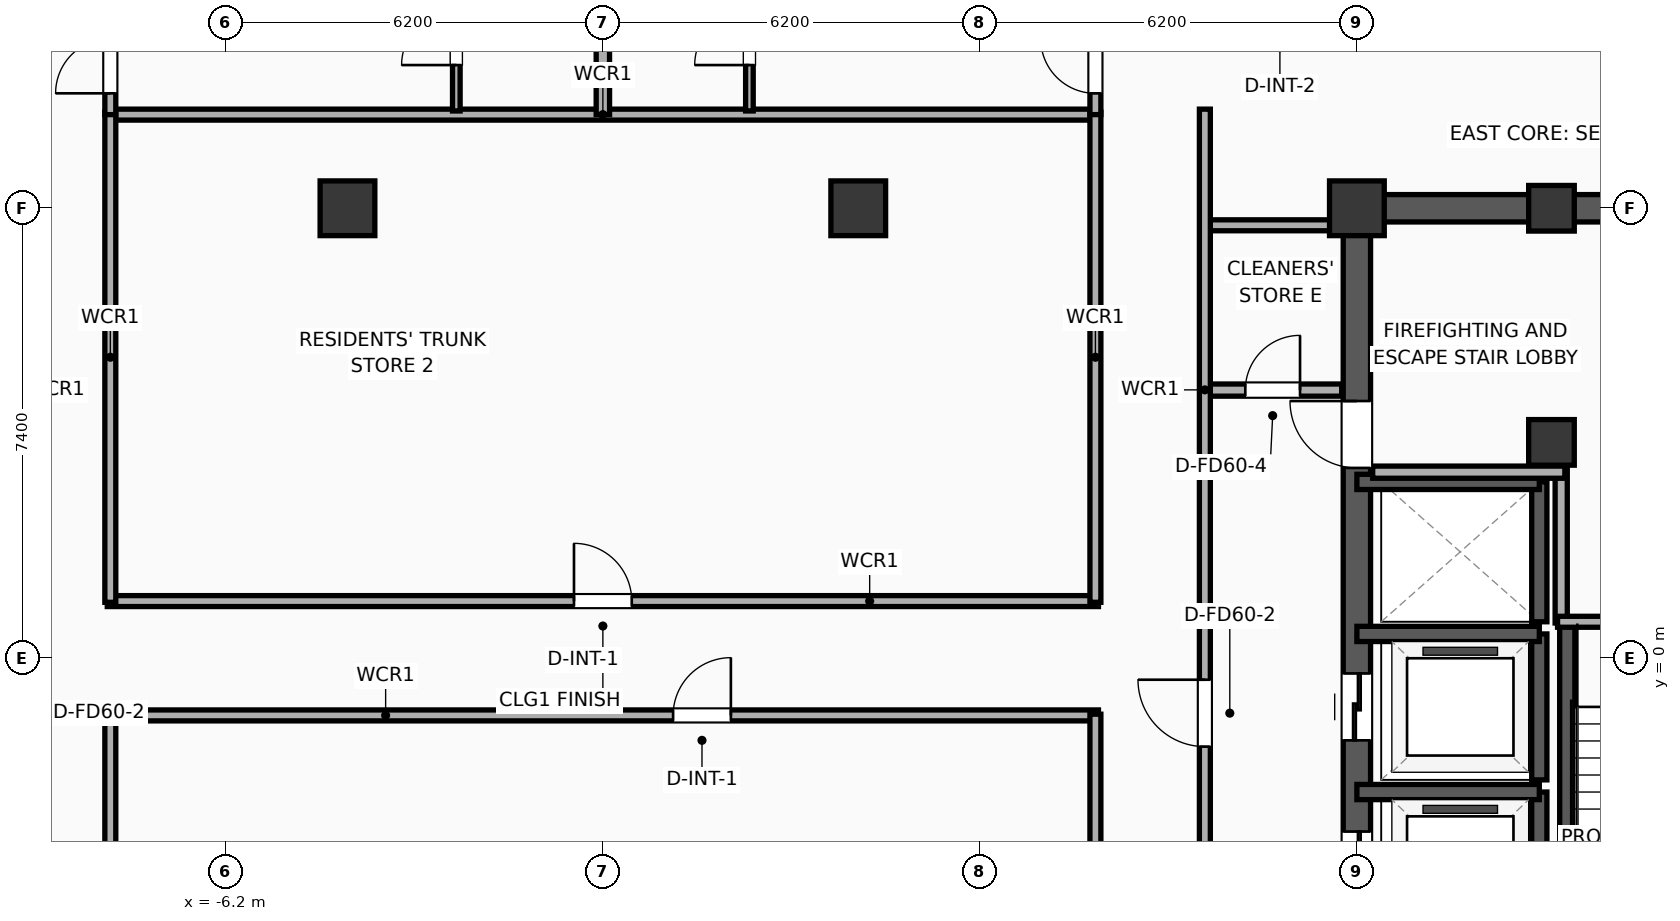
"""IFC4 building model, lengths in metres.
Left out: names, types, materials, properties, quantities, classifications, styles, units other than length and angle.
Written with IfcOpenShell. Run it as: python <this file> out.ifc"""

import sys

from ifc_helpers import new_model, si_unit, direction, frame, frame_2d, origin, origin_2d, place, context, subcontext, project, spatial, rectangle, extrude, element, fill, save


model = new_model("IFC4")
c1 = context("Model", 3, precision=1e-05, world=origin(), true_north=direction((0.0, 1.0)))
c2 = subcontext(c1, "Body", "Model", "MODEL_VIEW")
j1 = project(units=[si_unit("LENGTHUNIT", "METRE"), si_unit("PLANEANGLEUNIT", "RADIAN")], contexts=[c1])
p1 = place(None, origin())
s1 = spatial("IfcSite", under=j1, at=p1, CompositionType="ELEMENT")
p2 = place(p1, origin())
s2 = spatial("IfcBuilding", under=s1, at=p2, CompositionType="ELEMENT")
p3 = place(p2, frame((0.0, 0.0, 159.9)))
s3 = spatial("IfcBuildingStorey", under=s2, at=p3, CompositionType="ELEMENT", Elevation=159.9)
p4 = place(p3, frame((15.6, 3.55, 0.0), z_axis=(0.0, 0.0, 1.0), x_axis=(1.0, 0.0, 0.0)))
e1 = element("IfcColumn", 1, at=p4, inside=s3, PredefinedType="COLUMN", context=c2, shape_type="SweptSolid", body=[
    extrude(rectangle(XDim=0.75, YDim=0.75, at=origin_2d()), origin(), (0.0, 0.0, 1.0), 3.9),
])
p5 = place(p3, frame((12.4, 7.4, 0.0), z_axis=(0.0, 0.0, 1.0), x_axis=(1.0, 0.0, 0.0)))
e2 = element("IfcColumn", 2, at=p5, inside=s3, PredefinedType="COLUMN", context=c2, shape_type="SweptSolid", body=[
    extrude(rectangle(XDim=0.9, YDim=0.9, at=origin_2d()), origin(), (0.0, 0.0, 1.0), 3.9),
])
p6 = place(p3, frame((15.6, 7.4, 0.0), z_axis=(0.0, 0.0, 1.0), x_axis=(1.0, 0.0, 0.0)))
e3 = element("IfcColumn", 3, at=p6, inside=s3, PredefinedType="COLUMN", context=c2, shape_type="SweptSolid", body=[
    extrude(rectangle(XDim=0.75, YDim=0.75, at=origin_2d()), origin(), (0.0, 0.0, 1.0), 3.9),
])
p7 = place(p3, frame((12.175, 7.4, 0.0), z_axis=(0.0, 0.0, 1.0), x_axis=(1.0, 0.0, 0.0)))
e4 = element("IfcWall", 4, at=p7, inside=s3, PredefinedType="SHEAR", context=c2, shape_type="SweptSolid", body=[
    extrude(rectangle(XDim=7.25, YDim=0.45, at=frame_2d((3.625, 0.0))), origin(), (0.0, 0.0, 1.0), 3.65),
])
p8 = place(p3, frame((12.4, -7.4, 0.0), z_axis=(0.0, 0.0, 1.0), x_axis=(0.0, 1.0, 0.0)))
e5 = element("IfcWall", 5, at=p8, inside=s3, PredefinedType="SHEAR", context=c2, shape_type="SweptSolid", body=[
    extrude(rectangle(XDim=14.8, YDim=0.45, at=frame_2d((7.4, 0.0))), origin(), (0.0, 0.0, 1.0), 3.65),
])
p9 = place(p8, frame((3.45, 0.0, 0.0)))
e6 = element("IfcOpeningElement", 6, at=p9, cuts=e5, PredefinedType="OPENING", context=c2, shape_type="SweptSolid", body=[
    extrude(rectangle(XDim=1.1, YDim=2.05, at=frame_2d((0.55, 1.025))), frame((0.0, 0.235, 0.0), z_axis=(0.0, -1.0, 0.0), x_axis=(1.0, 0.0, 0.0)), (0.0, 0.0, 1.0), 0.47),
])
p10 = place(p8, frame((6.05, 0.0, 0.0)))
e7 = element("IfcOpeningElement", 7, at=p10, cuts=e5, PredefinedType="OPENING", context=c2, shape_type="SweptSolid", body=[
    extrude(rectangle(XDim=1.1, YDim=2.05, at=frame_2d((0.55, 1.025))), frame((0.0, 0.235, 0.0), z_axis=(0.0, -1.0, 0.0), x_axis=(1.0, 0.0, 0.0)), (0.0, 0.0, 1.0), 0.47),
])
p11 = place(p8, frame((10.53, 0.0, 0.0)))
e8 = element("IfcOpeningElement", 8, at=p11, cuts=e5, PredefinedType="OPENING", context=c2, shape_type="SweptSolid", body=[
    extrude(rectangle(XDim=1.1, YDim=2.05, at=frame_2d((0.55, 1.025))), frame((0.0, 0.235, 0.0), z_axis=(0.0, -1.0, 0.0), x_axis=(1.0, 0.0, 0.0)), (0.0, 0.0, 1.0), 0.47),
])
p12 = place(p8, frame((1.0, 0.0, 0.0)))
e9 = element("IfcOpeningElement", 9, at=p12, cuts=e5, PredefinedType="OPENING", context=c2, shape_type="SweptSolid", body=[
    extrude(rectangle(XDim=0.9, YDim=2.05, at=frame_2d((0.45, 1.025))), frame((0.0, 0.235, 0.0), z_axis=(0.0, -1.0, 0.0), x_axis=(1.0, 0.0, 0.0)), (0.0, 0.0, 1.0), 0.47),
])
p13 = place(p3, frame((15.86, -7.085, 0.0), z_axis=(0.0, 0.0, 1.0), x_axis=(0.0, 1.0, 0.0)))
e10 = element("IfcWall", 10, at=p13, inside=s3, PredefinedType="SOLIDWALL", context=c2, shape_type="SweptSolid", body=[
    extrude(rectangle(XDim=7.685, YDim=0.25, at=frame_2d((3.843, 0.0))), origin(), (0.0, 0.0, 1.0), 3.65),
])
for number, where, z_axis, x_axis in (
    (11, (-4.2, 7.4, 0.0), (0.0, 0.0, 1.0), (1.0, 0.0, 0.0)),
    (12, (4.2, 7.4, 0.0), (0.0, 0.0, 1.0), (1.0, 0.0, 0.0)),
):
    element("IfcColumn", number, at=place(p3, frame(where, z_axis=z_axis, x_axis=x_axis)), inside=s3, PredefinedType="COLUMN", context=c2, shape_type="SweptSolid", body=[
        extrude(rectangle(XDim=0.9, YDim=0.9, at=origin_2d()), origin(), (0.0, 0.0, 1.0), 3.9),
    ])
p14 = place(p3, frame((15.4, -4.6, 0.0), z_axis=(0.0, 0.0, 1.0), x_axis=(0.0, 1.0, 0.0)))
e13 = element("IfcWall", 13, at=p14, inside=s3, PredefinedType="SOLIDWALL", context=c2, shape_type="SweptSolid", body=[
    extrude(rectangle(XDim=2.4, YDim=0.25, at=frame_2d((1.2, 0.0))), origin(), (0.0, 0.0, 1.0), 3.65),
])
p15 = place(p3, frame((15.4, -2.2, 0.0), z_axis=(0.0, 0.0, 1.0), x_axis=(-1.0, 0.0, 0.0)))
e14 = element("IfcWall", 14, at=p15, inside=s3, PredefinedType="SOLIDWALL", context=c2, shape_type="SweptSolid", body=[
    extrude(rectangle(XDim=3.0, YDim=0.25, at=frame_2d((1.5, 0.0))), origin(), (0.0, 0.0, 1.0), 3.65),
])
p16 = place(p3, frame((15.4, -2.0, 0.0), z_axis=(0.0, 0.0, 1.0), x_axis=(0.0, 1.0, 0.0)))
e15 = element("IfcWall", 15, at=p16, inside=s3, PredefinedType="SOLIDWALL", context=c2, shape_type="SweptSolid", body=[
    extrude(rectangle(XDim=2.4, YDim=0.25, at=frame_2d((1.2, 0.0))), origin(), (0.0, 0.0, 1.0), 3.65),
])
p17 = place(p3, frame((15.4, 0.4, 0.0), z_axis=(0.0, 0.0, 1.0), x_axis=(-1.0, 0.0, 0.0)))
e16 = element("IfcWall", 16, at=p17, inside=s3, PredefinedType="SOLIDWALL", context=c2, shape_type="SweptSolid", body=[
    extrude(rectangle(XDim=3.0, YDim=0.25, at=frame_2d((1.5, 0.0))), origin(), (0.0, 0.0, 1.0), 3.65),
])
p18 = place(p3, frame((15.4, 0.6, 0.0), z_axis=(0.0, 0.0, 1.0), x_axis=(0.0, 1.0, 0.0)))
e17 = element("IfcWall", 17, at=p18, inside=s3, PredefinedType="SOLIDWALL", context=c2, shape_type="SweptSolid", body=[
    extrude(rectangle(XDim=2.3, YDim=0.25, at=frame_2d((1.15, 0.0))), origin(), (0.0, 0.0, 1.0), 3.65),
])
p19 = place(p3, frame((15.4, 2.9, 0.0), z_axis=(0.0, 0.0, 1.0), x_axis=(-1.0, 0.0, 0.0)))
e18 = element("IfcWall", 18, at=p19, inside=s3, PredefinedType="SOLIDWALL", context=c2, shape_type="SweptSolid", body=[
    extrude(rectangle(XDim=3.0, YDim=0.25, at=frame_2d((1.5, 0.0))), origin(), (0.0, 0.0, 1.0), 3.65),
])
p20 = place(p3, frame((15.76, 0.58, 0.0), z_axis=(0.0, 0.0, 1.0), x_axis=(0.0, 1.0, 0.0)))
e19 = element("IfcWall", 19, at=p20, inside=s3, PredefinedType="PARTITIONING", context=c2, shape_type="SweptSolid", body=[
    extrude(rectangle(XDim=2.52, YDim=0.2, at=frame_2d((1.26, 0.0))), origin(), (0.0, 0.0, 1.0), 3.65),
])
p21 = place(p3, frame((12.66, 3.06, 0.0), z_axis=(0.0, 0.0, 1.0), x_axis=(1.0, 0.0, 0.0)))
e20 = element("IfcWall", 20, at=p21, inside=s3, PredefinedType="PARTITIONING", context=c2, shape_type="SweptSolid", body=[
    extrude(rectangle(XDim=3.16, YDim=0.2, at=frame_2d((1.58, 0.0))), origin(), (0.0, 0.0, 1.0), 3.65),
])
p22 = place(p3, frame((15.7, 0.6, 0.0), z_axis=(0.0, 0.0, 1.0), x_axis=(1.0, 0.0, 0.0)))
e21 = element("IfcWall", 21, at=p22, inside=s3, PredefinedType="PARTITIONING", context=c2, shape_type="SweptSolid", body=[
    extrude(rectangle(XDim=3.36, YDim=0.18, at=frame_2d((1.68, 0.0))), origin(), (0.0, 0.0, 1.0), 3.65),
])
p23 = place(p22, frame((1.155, 0.0, 0.0)))
e22 = element("IfcOpeningElement", 22, at=p23, cuts=e21, PredefinedType="OPENING", context=c2, shape_type="SweptSolid", body=[
    extrude(rectangle(XDim=1.05, YDim=2.05, at=frame_2d((0.525, 1.025))), frame((0.0, 0.1, 0.0), z_axis=(0.0, -1.0, 0.0), x_axis=(1.0, 0.0, 0.0)), (0.0, 0.0, 1.0), 0.2),
])
p24 = place(p3, frame((9.88, 4.41, 0.0), z_axis=(0.0, 0.0, 1.0), x_axis=(1.0, 0.0, 0.0)))
e23 = element("IfcWall", 23, at=p24, inside=s3, PredefinedType="PARTITIONING", context=c2, shape_type="SweptSolid", body=[
    extrude(rectangle(XDim=2.27, YDim=0.2, at=frame_2d((1.135, 0.0))), origin(), (0.0, 0.0, 1.0), 3.65),
])
p25 = place(p24, frame((0.685, 0.0, 0.0)))
e24 = element("IfcOpeningElement", 24, at=p25, cuts=e23, PredefinedType="OPENING", context=c2, shape_type="SweptSolid", body=[
    extrude(rectangle(XDim=0.9, YDim=2.05, at=frame_2d((0.45, 1.025))), frame((0.0, 0.11, 0.0), z_axis=(0.0, -1.0, 0.0), x_axis=(1.0, 0.0, 0.0)), (0.0, 0.0, 1.0), 0.22),
])
p26 = place(p3, frame((9.88, 7.12, 0.0), z_axis=(0.0, 0.0, 1.0), x_axis=(1.0, 0.0, 0.0)))
e25 = element("IfcWall", 25, at=p26, inside=s3, PredefinedType="PARTITIONING", context=c2, shape_type="SweptSolid", body=[
    extrude(rectangle(XDim=2.27, YDim=0.18, at=frame_2d((1.135, 0.0))), origin(), (0.0, 0.0, 1.0), 3.65),
])
p27 = place(p3, frame((9.9, -9.03, 0.0), z_axis=(0.0, 0.0, 1.0), x_axis=(0.0, 1.0, 0.0)))
e26 = element("IfcWall", 26, at=p27, inside=s3, PredefinedType="PARTITIONING", context=c2, shape_type="SweptSolid", body=[
    extrude(rectangle(XDim=18.06, YDim=0.18, at=frame_2d((9.03, 0.0))), origin(), (0.0, 0.0, 1.0), 3.65),
])
p28 = place(p27, frame((7.577, 0.0, 0.0)))
e27 = element("IfcOpeningElement", 27, at=p28, cuts=e26, PredefinedType="OPENING", context=c2, shape_type="SweptSolid", body=[
    extrude(rectangle(XDim=1.1, YDim=2.05, at=frame_2d((0.55, 1.025))), frame((0.0, 0.1, 0.0), z_axis=(0.0, -1.0, 0.0), x_axis=(1.0, 0.0, 0.0)), (0.0, 0.0, 1.0), 0.2),
])
p29 = place(p3, frame((-8.15, 8.94, 0.0), z_axis=(0.0, 0.0, 1.0), x_axis=(1.0, 0.0, 0.0)))
e28 = element("IfcWall", 28, at=p29, inside=s3, PredefinedType="PARTITIONING", context=c2, shape_type="SweptSolid", body=[
    extrude(rectangle(XDim=16.3, YDim=0.18, at=frame_2d((8.15, 0.0))), origin(), (0.0, 0.0, 1.0), 3.65),
])
p30 = place(p3, frame((-8.15, 0.94, 0.0), z_axis=(0.0, 0.0, 1.0), x_axis=(1.0, 0.0, 0.0)))
e29 = element("IfcWall", 29, at=p30, inside=s3, PredefinedType="PARTITIONING", context=c2, shape_type="SweptSolid", body=[
    extrude(rectangle(XDim=16.3, YDim=0.18, at=frame_2d((8.15, 0.0))), origin(), (0.0, 0.0, 1.0), 3.65),
])
p31 = place(p30, frame((7.675, 0.0, 0.0)))
e30 = element("IfcOpeningElement", 30, at=p31, cuts=e29, PredefinedType="OPENING", context=c2, shape_type="SweptSolid", body=[
    extrude(rectangle(XDim=0.95, YDim=2.05, at=frame_2d((0.475, 1.025))), frame((0.0, 0.1, 0.0), z_axis=(0.0, -1.0, 0.0), x_axis=(1.0, 0.0, 0.0)), (0.0, 0.0, 1.0), 0.2),
])
p32 = place(p3, frame((-8.15, -0.94, 0.0), z_axis=(0.0, 0.0, 1.0), x_axis=(1.0, 0.0, 0.0)))
e31 = element("IfcWall", 31, at=p32, inside=s3, PredefinedType="PARTITIONING", context=c2, shape_type="SweptSolid", body=[
    extrude(rectangle(XDim=16.3, YDim=0.18, at=frame_2d((8.15, 0.0))), origin(), (0.0, 0.0, 1.0), 3.65),
])
p33 = place(p32, frame((9.305, 0.0, 0.0)))
e32 = element("IfcOpeningElement", 32, at=p33, cuts=e31, PredefinedType="OPENING", context=c2, shape_type="SweptSolid", body=[
    extrude(rectangle(XDim=0.95, YDim=2.05, at=frame_2d((0.475, 1.025))), frame((0.0, 0.1, 0.0), z_axis=(0.0, -1.0, 0.0), x_axis=(1.0, 0.0, 0.0)), (0.0, 0.0, 1.0), 0.2),
])
p34 = place(p3, frame((-8.1, 0.92, 0.0), z_axis=(0.0, 0.0, 1.0), x_axis=(0.0, 1.0, 0.0)))
e33 = element("IfcWall", 33, at=p34, inside=s3, PredefinedType="PARTITIONING", context=c2, shape_type="SweptSolid", body=[
    extrude(rectangle(XDim=8.06, YDim=0.18, at=frame_2d((4.03, 0.0))), origin(), (0.0, 0.0, 1.0), 3.65),
])
p35 = place(p3, frame((-8.1, -8.98, 0.0), z_axis=(0.0, 0.0, 1.0), x_axis=(0.0, 1.0, 0.0)))
e34 = element("IfcWall", 34, at=p35, inside=s3, PredefinedType="PARTITIONING", context=c2, shape_type="SweptSolid", body=[
    extrude(rectangle(XDim=8.06, YDim=0.18, at=frame_2d((4.03, 0.0))), origin(), (0.0, 0.0, 1.0), 3.65),
])
p36 = place(p35, frame((0.79, 0.0, 0.0)))
e35 = element("IfcOpeningElement", 35, at=p36, cuts=e34, PredefinedType="OPENING", context=c2, shape_type="SweptSolid", body=[
    extrude(rectangle(XDim=1.0, YDim=2.05, at=frame_2d((0.5, 1.025))), frame((0.0, 0.1, 0.0), z_axis=(0.0, -1.0, 0.0), x_axis=(1.0, 0.0, 0.0)), (0.0, 0.0, 1.0), 0.2),
])
for number, where, z_axis, x_axis in (
    (36, (8.1, 0.92, 0.0), (0.0, 0.0, 1.0), (0.0, 1.0, 0.0)),
    (37, (8.1, -8.98, 0.0), (0.0, 0.0, 1.0), (0.0, 1.0, 0.0)),
):
    element("IfcWall", number, at=place(p3, frame(where, z_axis=z_axis, x_axis=x_axis)), inside=s3, PredefinedType="PARTITIONING", context=c2, shape_type="SweptSolid", body=[
        extrude(rectangle(XDim=8.06, YDim=0.18, at=frame_2d((4.03, 0.0))), origin(), (0.0, 0.0, 1.0), 3.65),
    ])
p37 = place(p3, frame((-2.41, 9.0, 0.0), z_axis=(0.0, 0.0, 1.0), x_axis=(0.0, 1.0, 0.0)))
e38 = element("IfcWall", 38, at=p37, inside=s3, PredefinedType="PARTITIONING", context=c2, shape_type="SweptSolid", body=[
    extrude(rectangle(XDim=2.41, YDim=0.125, at=frame_2d((1.205, 0.0))), origin(), (0.0, 0.0, 1.0), 3.65),
])
p38 = place(p37, frame((0.755, 0.0, 0.0)))
e39 = element("IfcOpeningElement", 39, at=p38, cuts=e38, PredefinedType="OPENING", context=c2, shape_type="SweptSolid", body=[
    extrude(rectangle(XDim=0.9, YDim=2.05, at=frame_2d((0.45, 1.025))), frame((0.0, 0.073, 0.0), z_axis=(0.0, -1.0, 0.0), x_axis=(1.0, 0.0, 0.0)), (0.0, 0.0, 1.0), 0.145),
])
p39 = place(p3, frame((-8.1, 8.94, 0.0), z_axis=(0.0, 0.0, 1.0), x_axis=(0.0, 1.0, 0.0)))
e40 = element("IfcWall", 40, at=p39, inside=s3, PredefinedType="PARTITIONING", context=c2, shape_type="SweptSolid", body=[
    extrude(rectangle(XDim=10.286, YDim=0.18, at=frame_2d((5.143, 0.0))), origin(), (0.0, 0.0, 1.0), 3.65),
])
p40 = place(p39, frame((0.35, 0.0, 0.0)))
e41 = element("IfcOpeningElement", 41, at=p40, cuts=e40, PredefinedType="OPENING", context=c2, shape_type="SweptSolid", body=[
    extrude(rectangle(XDim=0.9, YDim=2.05, at=frame_2d((0.45, 1.025))), frame((0.0, 0.1, 0.0), z_axis=(0.0, -1.0, 0.0), x_axis=(1.0, 0.0, 0.0)), (0.0, 0.0, 1.0), 0.2),
])
p41 = place(p3, frame((2.41, 9.0, 0.0), z_axis=(0.0, 0.0, 1.0), x_axis=(0.0, 1.0, 0.0)))
e42 = element("IfcWall", 42, at=p41, inside=s3, PredefinedType="PARTITIONING", context=c2, shape_type="SweptSolid", body=[
    extrude(rectangle(XDim=2.41, YDim=0.125, at=frame_2d((1.205, 0.0))), origin(), (0.0, 0.0, 1.0), 3.65),
])
p42 = place(p41, frame((0.755, 0.0, 0.0)))
e43 = element("IfcOpeningElement", 43, at=p42, cuts=e42, PredefinedType="OPENING", context=c2, shape_type="SweptSolid", body=[
    extrude(rectangle(XDim=0.9, YDim=2.05, at=frame_2d((0.45, 1.025))), frame((0.0, 0.073, 0.0), z_axis=(0.0, -1.0, 0.0), x_axis=(1.0, 0.0, 0.0)), (0.0, 0.0, 1.0), 0.145),
])
p43 = place(p3, frame((8.1, 8.94, 0.0), z_axis=(0.0, 0.0, 1.0), x_axis=(0.0, 1.0, 0.0)))
e44 = element("IfcWall", 44, at=p43, inside=s3, PredefinedType="PARTITIONING", context=c2, shape_type="SweptSolid", body=[
    extrude(rectangle(XDim=11.989, YDim=0.18, at=frame_2d((5.995, 0.0))), origin(), (0.0, 0.0, 1.0), 3.65),
])
p44 = place(p43, frame((0.35, 0.0, 0.0)))
e45 = element("IfcOpeningElement", 45, at=p44, cuts=e44, PredefinedType="OPENING", context=c2, shape_type="SweptSolid", body=[
    extrude(rectangle(XDim=0.9, YDim=2.05, at=frame_2d((0.45, 1.025))), frame((0.0, 0.1, 0.0), z_axis=(0.0, -1.0, 0.0), x_axis=(1.0, 0.0, 0.0)), (0.0, 0.0, 1.0), 0.2),
])
p45 = place(p3, frame((0.0, 8.94, 0.0), z_axis=(0.0, 0.0, 1.0), x_axis=(0.0, 1.0, 0.0)))
e46 = element("IfcWall", 46, at=p45, inside=s3, PredefinedType="PARTITIONING", context=c2, shape_type="SweptSolid", body=[
    extrude(rectangle(XDim=11.138, YDim=0.22, at=frame_2d((5.569, 0.0))), origin(), (0.0, 0.0, 1.0), 3.04),
])
p46 = place(p9, origin())
e47 = element("IfcDoor", 47, at=p46, inside=s3, OperationType="SLIDING_TO_LEFT", PredefinedType="DOOR", context=c2, shape_type="SweptSolid", body=[
    extrude(rectangle(XDim=1.1, YDim=2.05, at=frame_2d((0.55, 1.025))), frame((0.0, 0.025, 0.0), z_axis=(0.0, -1.0, 0.0), x_axis=(1.0, 0.0, 0.0)), (0.0, 0.0, 1.0), 0.05),
])
fill(e6, e47)
p47 = place(p10, origin())
e48 = element("IfcDoor", 48, at=p47, inside=s3, OperationType="SLIDING_TO_LEFT", PredefinedType="DOOR", context=c2, shape_type="SweptSolid", body=[
    extrude(rectangle(XDim=1.1, YDim=2.05, at=frame_2d((0.55, 1.025))), frame((0.0, 0.025, 0.0), z_axis=(0.0, -1.0, 0.0), x_axis=(1.0, 0.0, 0.0)), (0.0, 0.0, 1.0), 0.05),
])
fill(e7, e48)
p48 = place(p25, origin())
e49 = element("IfcDoor", 49, at=p48, inside=s3, OperationType="SINGLE_SWING_RIGHT", PredefinedType="DOOR", context=c2, shape_type="SweptSolid", body=[
    extrude(rectangle(XDim=0.9, YDim=2.05, at=frame_2d((0.45, 1.025))), frame((0.0, 0.025, 0.0), z_axis=(0.0, -1.0, 0.0), x_axis=(1.0, 0.0, 0.0)), (0.0, 0.0, 1.0), 0.05),
])
fill(e24, e49)
p49 = place(p28, origin())
e50 = element("IfcDoor", 50, at=p49, inside=s3, OperationType="SINGLE_SWING_RIGHT", PredefinedType="DOOR", context=c2, shape_type="SweptSolid", body=[
    extrude(rectangle(XDim=1.1, YDim=2.05, at=frame_2d((0.55, 1.025))), frame((0.0, 0.025, 0.0), z_axis=(0.0, -1.0, 0.0), x_axis=(1.0, 0.0, 0.0)), (0.0, 0.0, 1.0), 0.05),
])
fill(e27, e50)
p50 = place(p31, origin())
e51 = element("IfcDoor", 51, at=p50, inside=s3, OperationType="SINGLE_SWING_LEFT", PredefinedType="DOOR", context=c2, shape_type="SweptSolid", body=[
    extrude(rectangle(XDim=0.95, YDim=2.05, at=frame_2d((0.475, 1.025))), frame((0.0, 0.025, 0.0), z_axis=(0.0, -1.0, 0.0), x_axis=(1.0, 0.0, 0.0)), (0.0, 0.0, 1.0), 0.05),
])
fill(e30, e51)
p51 = place(p33, origin())
e52 = element("IfcDoor", 52, at=p51, inside=s3, OperationType="SINGLE_SWING_RIGHT", PredefinedType="DOOR", context=c2, shape_type="SweptSolid", body=[
    extrude(rectangle(XDim=0.95, YDim=2.05, at=frame_2d((0.475, 1.025))), frame((0.0, 0.025, 0.0), z_axis=(0.0, -1.0, 0.0), x_axis=(1.0, 0.0, 0.0)), (0.0, 0.0, 1.0), 0.05),
])
fill(e32, e52)
p52 = place(p38, origin())
e53 = element("IfcDoor", 53, at=p52, inside=s3, OperationType="SINGLE_SWING_LEFT", PredefinedType="DOOR", context=c2, shape_type="SweptSolid", body=[
    extrude(rectangle(XDim=0.9, YDim=2.05, at=frame_2d((0.45, 1.025))), frame((0.0, 0.025, 0.0), z_axis=(0.0, -1.0, 0.0), x_axis=(1.0, 0.0, 0.0)), (0.0, 0.0, 1.0), 0.05),
])
fill(e39, e53)
p53 = place(p40, origin())
e54 = element("IfcDoor", 54, at=p53, inside=s3, OperationType="SINGLE_SWING_LEFT", PredefinedType="DOOR", context=c2, shape_type="SweptSolid", body=[
    extrude(rectangle(XDim=0.9, YDim=2.05, at=frame_2d((0.45, 1.025))), frame((0.0, 0.025, 0.0), z_axis=(0.0, -1.0, 0.0), x_axis=(1.0, 0.0, 0.0)), (0.0, 0.0, 1.0), 0.05),
])
fill(e41, e54)
p54 = place(p42, origin())
e55 = element("IfcDoor", 55, at=p54, inside=s3, OperationType="SINGLE_SWING_LEFT", PredefinedType="DOOR", context=c2, shape_type="SweptSolid", body=[
    extrude(rectangle(XDim=0.9, YDim=2.05, at=frame_2d((0.45, 1.025))), frame((0.0, 0.025, 0.0), z_axis=(0.0, -1.0, 0.0), x_axis=(1.0, 0.0, 0.0)), (0.0, 0.0, 1.0), 0.05),
])
fill(e43, e55)
p55 = place(p44, origin())
e56 = element("IfcDoor", 56, at=p55, inside=s3, OperationType="SINGLE_SWING_RIGHT", PredefinedType="DOOR", context=c2, shape_type="SweptSolid", body=[
    extrude(rectangle(XDim=0.9, YDim=2.05, at=frame_2d((0.45, 1.025))), frame((0.0, 0.025, 0.0), z_axis=(0.0, -1.0, 0.0), x_axis=(1.0, 0.0, 0.0)), (0.0, 0.0, 1.0), 0.05),
])
fill(e45, e56)
p56 = place(p11, origin())
e57 = element("IfcDoor", 57, at=p56, inside=s3, OperationType="SINGLE_SWING_RIGHT", PredefinedType="DOOR", context=c2, shape_type="SweptSolid", body=[
    extrude(rectangle(XDim=1.1, YDim=2.05, at=frame_2d((0.55, 1.025))), frame((0.0, 0.025, 0.0), z_axis=(0.0, -1.0, 0.0), x_axis=(1.0, 0.0, 0.0)), (0.0, 0.0, 1.0), 0.05),
])
fill(e8, e57)
save(model, sys.argv[1])
